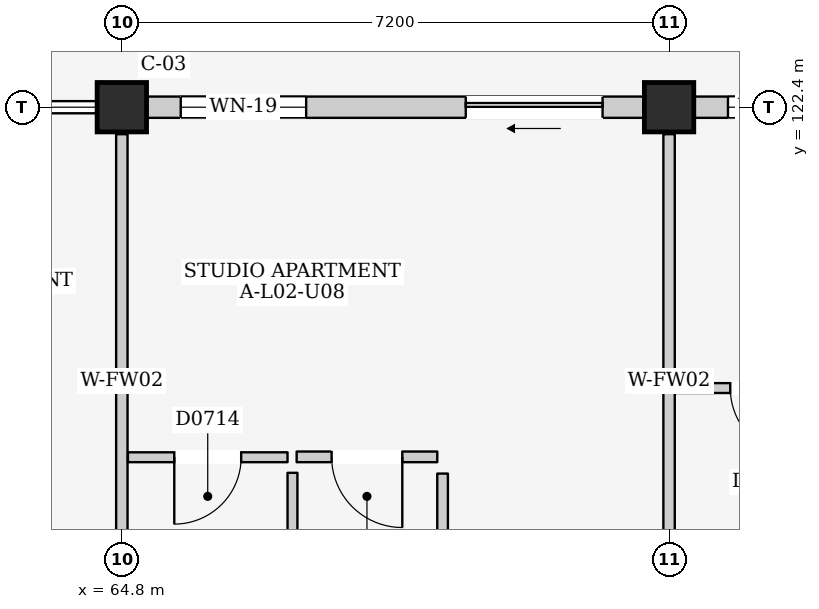
"""IFC4 building model, lengths in metres.
Left out: names, types, materials, properties, quantities, classifications, styles, units other than length and angle.
Written with IfcOpenShell. Run it as: python <this file> out.ifc"""

import sys

from ifc_helpers import new_model, si_unit, direction, frame, frame_2d, origin, origin_2d, place, context, subcontext, project, spatial, rectangle, extrude, element, fill, save


model = new_model("IFC4")
c1 = context("Model", 3, precision=1e-05, world=origin(), true_north=direction((0.0, 1.0)))
c2 = subcontext(c1, "Body", "Model", "MODEL_VIEW")
j1 = project(units=[si_unit("LENGTHUNIT", "METRE"), si_unit("PLANEANGLEUNIT", "RADIAN")], contexts=[c1])
p1 = place(None, origin())
s1 = spatial("IfcSite", under=j1, at=p1, CompositionType="ELEMENT")
p2 = place(p1, origin())
s2 = spatial("IfcBuilding", under=s1, at=p2, CompositionType="ELEMENT")
p3 = place(p2, frame((0.0, 0.0, 9.0)))
s3 = spatial("IfcBuildingStorey", under=s2, at=p3, CompositionType="ELEMENT", Elevation=9.0)
for number, where, z_axis, x_axis in (
    (1, (64.8, 122.4, 0.0), (0.0, 0.0, 1.0), (1.0, 0.0, 0.0)),
    (2, (72.0, 122.4, 0.0), (0.0, 0.0, 1.0), (1.0, 0.0, 0.0)),
):
    element("IfcColumn", number, at=place(p3, frame(where, z_axis=z_axis, x_axis=x_axis)), inside=s3, PredefinedType="COLUMN", context=c2, shape_type="SweptSolid", body=[
        extrude(rectangle(XDim=0.65, YDim=0.65, at=origin_2d()), origin(), (0.0, 0.0, 1.0), 3.2),
    ])
p4 = place(p3, frame((65.125, 122.4, 0.0), z_axis=(0.0, 0.0, 1.0), x_axis=(1.0, 0.0, 0.0)))
e3 = element("IfcWall", 3, at=p4, inside=s3, PredefinedType="ELEMENTEDWALL", context=c2, shape_type="SweptSolid", body=[
    extrude(rectangle(XDim=6.55, YDim=0.28, at=frame_2d((3.275, 0.0))), origin(), (0.0, 0.0, 1.0), 2.425),
])
p5 = place(p4, frame((4.2, 0.0, 0.0)))
e4 = element("IfcOpeningElement", 4, at=p5, cuts=e3, PredefinedType="OPENING", context=c2, shape_type="SweptSolid", body=[
    extrude(rectangle(XDim=1.8, YDim=2.12, at=frame_2d((0.9, 1.06))), frame((0.0, 0.155, 0.0), z_axis=(0.0, -1.0, 0.0), x_axis=(1.0, 0.0, 0.0)), (0.0, 0.0, 1.0), 0.31),
])
p6 = place(p4, frame((0.45, 0.0, 0.9)))
e5 = element("IfcOpeningElement", 5, at=p6, cuts=e3, PredefinedType="OPENING", context=c2, shape_type="SweptSolid", body=[
    extrude(rectangle(XDim=1.65, YDim=1.35, at=frame_2d((0.825, 0.675))), frame((0.0, 0.155, 0.0), z_axis=(0.0, -1.0, 0.0), x_axis=(1.0, 0.0, 0.0)), (0.0, 0.0, 1.0), 0.31),
])
p7 = place(p3, frame((72.325, 122.4, 0.0), z_axis=(0.0, 0.0, 1.0), x_axis=(1.0, 0.0, 0.0)))
e6 = element("IfcWall", 6, at=p7, inside=s3, PredefinedType="ELEMENTEDWALL", context=c2, shape_type="SweptSolid", body=[
    extrude(rectangle(XDim=6.55, YDim=0.28, at=frame_2d((3.275, 0.0))), origin(), (0.0, 0.0, 1.0), 2.425),
])
p8 = place(p7, frame((4.4, 0.0, 0.0)))
e7 = element("IfcOpeningElement", 7, at=p8, cuts=e6, PredefinedType="OPENING", context=c2, shape_type="SweptSolid", body=[
    extrude(rectangle(XDim=1.6, YDim=2.12, at=frame_2d((0.8, 1.06))), frame((0.0, 0.155, 0.0), z_axis=(0.0, -1.0, 0.0), x_axis=(1.0, 0.0, 0.0)), (0.0, 0.0, 1.0), 0.31),
])
p9 = place(p7, frame((0.45, 0.0, 0.9)))
e8 = element("IfcOpeningElement", 8, at=p9, cuts=e6, PredefinedType="OPENING", context=c2, shape_type="SweptSolid", body=[
    extrude(rectangle(XDim=1.15, YDim=1.15, at=frame_2d((0.575, 0.575))), frame((0.0, 0.155, 0.0), z_axis=(0.0, -1.0, 0.0), x_axis=(1.0, 0.0, 0.0)), (0.0, 0.0, 1.0), 0.31),
])
for number, where, z_axis, x_axis in (
    (9, (64.8, 115.555, 0.0), (0.0, 0.0, 1.0), (0.0, 1.0, 0.0)),
    (10, (72.0, 115.555, 0.0), (0.0, 0.0, 1.0), (0.0, 1.0, 0.0)),
):
    element("IfcWall", number, at=place(p3, frame(where, z_axis=z_axis, x_axis=x_axis)), inside=s3, PredefinedType="PARTITIONING", context=c2, shape_type="SweptSolid", body=[
        extrude(rectangle(XDim=6.49, YDim=0.15, at=frame_2d((3.245, 0.0))), origin(), (0.0, 0.0, 1.0), 2.395),
    ])
p10 = place(p3, frame((64.88, 117.795, 0.0), z_axis=(0.0, 0.0, 1.0), x_axis=(1.0, 0.0, 0.0)))
e11 = element("IfcWall", 11, at=p10, inside=s3, PredefinedType="PARTITIONING", context=c2, shape_type="SweptSolid", body=[
    extrude(rectangle(XDim=2.1, YDim=0.13, at=frame_2d((1.05, 0.0))), origin(), (0.0, 0.0, 1.0), 2.96),
])
p11 = place(p10, frame((0.61, 0.0, 0.0)))
e12 = element("IfcOpeningElement", 12, at=p11, cuts=e11, PredefinedType="OPENING", context=c2, shape_type="SweptSolid", body=[
    extrude(rectangle(XDim=0.88, YDim=2.1, at=frame_2d((0.44, 1.05))), frame((0.0, 0.08, 0.0), z_axis=(0.0, -1.0, 0.0), x_axis=(1.0, 0.0, 0.0)), (0.0, 0.0, 1.0), 0.16),
])
p12 = place(p3, frame((67.045, 115.46, 0.0), z_axis=(0.0, 0.0, 1.0), x_axis=(0.0, 1.0, 0.0)))
e13 = element("IfcWall", 13, at=p12, inside=s3, PredefinedType="PARTITIONING", context=c2, shape_type="SweptSolid", body=[
    extrude(rectangle(XDim=2.13, YDim=0.13, at=frame_2d((1.065, 0.0))), origin(), (0.0, 0.0, 1.0), 2.96),
])
p13 = place(p3, frame((67.1, 117.8, 0.0), z_axis=(0.0, 0.0, 1.0), x_axis=(1.0, 0.0, 0.0)))
e14 = element("IfcWall", 14, at=p13, inside=s3, PredefinedType="PARTITIONING", context=c2, shape_type="SweptSolid", body=[
    extrude(rectangle(XDim=1.85, YDim=0.14, at=frame_2d((0.925, 0.0))), origin(), (0.0, 0.0, 1.0), 2.96),
])
p14 = place(p13, frame((0.46, 0.0, 0.0)))
e15 = element("IfcOpeningElement", 15, at=p14, cuts=e14, PredefinedType="OPENING", context=c2, shape_type="SweptSolid", body=[
    extrude(rectangle(XDim=0.93, YDim=2.14, at=frame_2d((0.465, 1.07))), frame((0.0, 0.085, 0.0), z_axis=(0.0, -1.0, 0.0), x_axis=(1.0, 0.0, 0.0)), (0.0, 0.0, 1.0), 0.17),
])
p15 = place(p3, frame((69.02, 115.43, 0.0), z_axis=(0.0, 0.0, 1.0), x_axis=(0.0, 1.0, 0.0)))
e16 = element("IfcWall", 16, at=p15, inside=s3, PredefinedType="PARTITIONING", context=c2, shape_type="SweptSolid", body=[
    extrude(rectangle(XDim=2.15, YDim=0.14, at=frame_2d((1.075, 0.0))), origin(), (0.0, 0.0, 1.0), 2.96),
])
p16 = place(p3, frame((72.08, 118.705, 0.0), z_axis=(0.0, 0.0, 1.0), x_axis=(1.0, 0.0, 0.0)))
e17 = element("IfcWall", 17, at=p16, inside=s3, PredefinedType="PARTITIONING", context=c2, shape_type="SweptSolid", body=[
    extrude(rectangle(XDim=2.35, YDim=0.13, at=frame_2d((1.175, 0.0))), origin(), (0.0, 0.0, 1.0), 2.96),
])
p17 = place(p16, frame((0.725, 0.0, 0.0)))
e18 = element("IfcOpeningElement", 18, at=p17, cuts=e17, PredefinedType="OPENING", context=c2, shape_type="SweptSolid", body=[
    extrude(rectangle(XDim=0.9, YDim=2.1, at=frame_2d((0.45, 1.05))), frame((0.0, 0.08, 0.0), z_axis=(0.0, -1.0, 0.0), x_axis=(1.0, 0.0, 0.0)), (0.0, 0.0, 1.0), 0.16),
])
p18 = place(p5, frame((1.8, 0.0, 0.0), z_axis=(0.0, 0.0, 1.0), x_axis=(-1.0, 0.0, 0.0)))
e19 = element("IfcDoor", 19, at=p18, inside=s3, OperationType="SLIDING_TO_LEFT", PredefinedType="DOOR", context=c2, shape_type="SweptSolid", body=[
    extrude(rectangle(XDim=1.8, YDim=2.12, at=frame_2d((0.9, 1.06))), frame((0.0, 0.025, 0.0), z_axis=(0.0, -1.0, 0.0), x_axis=(1.0, 0.0, 0.0)), (0.0, 0.0, 1.0), 0.05),
])
fill(e4, e19)
p19 = place(p6, origin())
e20 = element("IfcWindow", 20, at=p19, inside=s3, PartitioningType="DOUBLE_PANEL_VERTICAL", PredefinedType="WINDOW", context=c2, shape_type="SweptSolid", body=[
    extrude(rectangle(XDim=1.65, YDim=1.35, at=frame_2d((0.825, 0.675))), frame((0.0, 0.03, 0.0), z_axis=(0.0, -1.0, 0.0), x_axis=(1.0, 0.0, 0.0)), (0.0, 0.0, 1.0), 0.06),
])
fill(e5, e20)
p20 = place(p9, origin())
e21 = element("IfcWindow", 21, at=p20, inside=s3, PartitioningType="SINGLE_PANEL", PredefinedType="WINDOW", context=c2, shape_type="SweptSolid", body=[
    extrude(rectangle(XDim=1.15, YDim=1.15, at=frame_2d((0.575, 0.575))), frame((0.0, 0.03, 0.0), z_axis=(0.0, -1.0, 0.0), x_axis=(1.0, 0.0, 0.0)), (0.0, 0.0, 1.0), 0.06),
])
fill(e8, e21)
p21 = place(p11, frame((0.88, 0.0, 0.0), z_axis=(0.0, 0.0, 1.0), x_axis=(-1.0, 0.0, 0.0)))
e22 = element("IfcDoor", 22, at=p21, inside=s3, OperationType="SINGLE_SWING_RIGHT", PredefinedType="DOOR", context=c2, shape_type="SweptSolid", body=[
    extrude(rectangle(XDim=0.88, YDim=2.1, at=frame_2d((0.44, 1.05))), frame((0.0, 0.025, 0.0), z_axis=(0.0, -1.0, 0.0), x_axis=(1.0, 0.0, 0.0)), (0.0, 0.0, 1.0), 0.05),
])
fill(e12, e22)
p22 = place(p14, frame((0.93, 0.0, 0.0), z_axis=(0.0, 0.0, 1.0), x_axis=(-1.0, 0.0, 0.0)))
e23 = element("IfcDoor", 23, at=p22, inside=s3, OperationType="SINGLE_SWING_LEFT", PredefinedType="DOOR", context=c2, shape_type="SweptSolid", body=[
    extrude(rectangle(XDim=0.93, YDim=2.14, at=frame_2d((0.465, 1.07))), frame((0.0, 0.025, 0.0), z_axis=(0.0, -1.0, 0.0), x_axis=(1.0, 0.0, 0.0)), (0.0, 0.0, 1.0), 0.05),
])
fill(e15, e23)
p23 = place(p17, frame((0.9, 0.0, 0.0), z_axis=(0.0, 0.0, 1.0), x_axis=(-1.0, 0.0, 0.0)))
e24 = element("IfcDoor", 24, at=p23, inside=s3, OperationType="SINGLE_SWING_LEFT", PredefinedType="DOOR", context=c2, shape_type="SweptSolid", body=[
    extrude(rectangle(XDim=0.9, YDim=2.1, at=frame_2d((0.45, 1.05))), frame((0.0, 0.025, 0.0), z_axis=(0.0, -1.0, 0.0), x_axis=(1.0, 0.0, 0.0)), (0.0, 0.0, 1.0), 0.05),
])
fill(e18, e24)
save(model, sys.argv[1])
